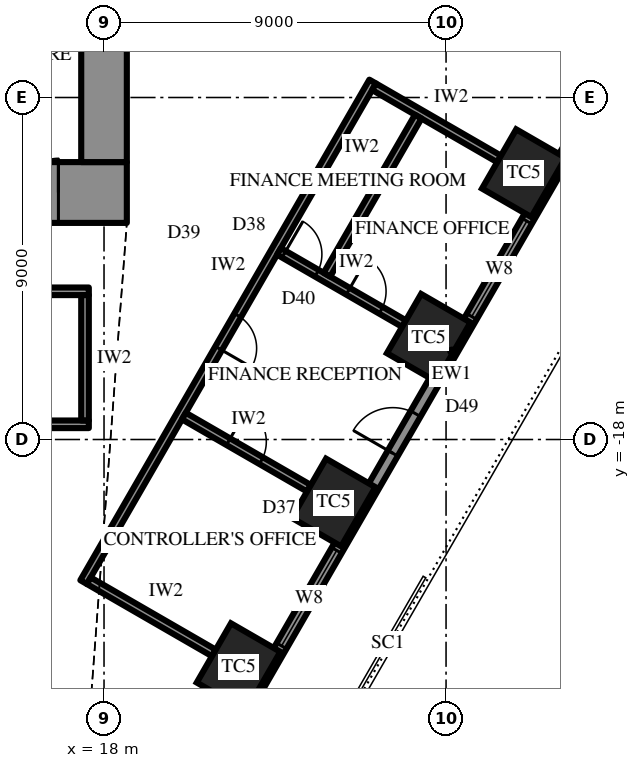
"""IFC4 building model, lengths in metres.
Left out: names, types, materials, properties, quantities, classifications, styles, units other than length and angle.
Written with IfcOpenShell. Run it as: python <this file> out.ifc"""

import sys

from ifc_helpers import new_model, si_unit, direction, frame, frame_2d, origin, origin_2d, place, context, subcontext, project, spatial, rectangle, extrude, element, fill, save


model = new_model("IFC4")
c1 = context("Model", 3, precision=1e-05, world=origin(), true_north=direction((0.0, 1.0)))
c2 = subcontext(c1, "Body", "Model", "MODEL_VIEW")
j1 = project(units=[si_unit("LENGTHUNIT", "METRE"), si_unit("PLANEANGLEUNIT", "RADIAN")], contexts=[c1])
p1 = place(None, origin())
s1 = spatial("IfcSite", under=j1, at=p1, CompositionType="ELEMENT")
p2 = place(p1, origin())
s2 = spatial("IfcBuilding", under=s1, at=p2, CompositionType="ELEMENT")
p3 = place(p2, frame((0.0, 0.0, 132.1)))
s3 = spatial("IfcBuildingStorey", under=s2, at=p3, CompositionType="ELEMENT", Elevation=132.1)
for number, where, z_axis, x_axis in (
    (1, (21.54, -23.992, 0.0), (0.0, 0.0, 1.0), (0.5, 0.866, 0.0)),
    (2, (24.042, -19.658, 0.0), (0.0, 0.0, 1.0), (0.5, 0.866, 0.0)),
    (3, (26.544, -15.325, 0.0), (0.0, 0.0, 1.0), (0.5, 0.866, 0.0)),
    (4, (29.045, -10.992, 0.0), (0.0, 0.0, 1.0), (0.5, 0.866, 0.0)),
):
    element("IfcColumn", number, at=place(p3, frame(where, z_axis=z_axis, x_axis=x_axis)), inside=s3, PredefinedType="COLUMN", context=c2, shape_type="SweptSolid", body=[
        extrude(rectangle(XDim=1.8, YDim=1.5, at=origin_2d()), origin(), (0.0, 0.0, 1.0), 4.2),
    ])
p4 = place(p3, frame((18.6, -11.5, 0.0), z_axis=(0.0, 0.0, 1.0), x_axis=(-1.0, 0.0, 0.0)))
e5 = element("IfcWall", 5, at=p4, inside=s3, PredefinedType="SHEAR", context=c2, shape_type="SweptSolid", body=[
    extrude(rectangle(XDim=37.2, YDim=1.6, at=frame_2d((18.6, 0.0))), origin(), (0.0, 0.0, 1.0), 4.2),
])
p5 = place(p4, frame((19.45, 0.0, 0.0)))
e6 = element("IfcOpeningElement", 6, at=p5, cuts=e5, PredefinedType="OPENING", context=c2, shape_type="SweptSolid", body=[
    extrude(rectangle(XDim=0.9, YDim=2.2, at=frame_2d((0.45, 1.1))), frame((0.0, 0.81, 0.0), z_axis=(0.0, -1.0, 0.0), x_axis=(1.0, 0.0, 0.0)), (0.0, 0.0, 1.0), 1.62),
])
p6 = place(p4, frame((22.45, 0.0, 0.0)))
e7 = element("IfcOpeningElement", 7, at=p6, cuts=e5, PredefinedType="OPENING", context=c2, shape_type="SweptSolid", body=[
    extrude(rectangle(XDim=0.9, YDim=2.2, at=frame_2d((0.45, 1.1))), frame((0.0, 0.81, 0.0), z_axis=(0.0, -1.0, 0.0), x_axis=(1.0, 0.0, 0.0)), (0.0, 0.0, 1.0), 1.62),
])
p7 = place(p4, frame((25.5, 0.0, 0.0)))
e8 = element("IfcOpeningElement", 8, at=p7, cuts=e5, PredefinedType="OPENING", context=c2, shape_type="SweptSolid", body=[
    extrude(rectangle(XDim=1.0, YDim=2.2, at=frame_2d((0.5, 1.1))), frame((0.0, 0.81, 0.0), z_axis=(0.0, -1.0, 0.0), x_axis=(1.0, 0.0, 0.0)), (0.0, 0.0, 1.0), 1.62),
])
p8 = place(p4, frame((1.8, 0.0, 0.0)))
e9 = element("IfcOpeningElement", 9, at=p8, cuts=e5, PredefinedType="OPENING", context=c2, shape_type="SweptSolid", body=[
    extrude(rectangle(XDim=0.9, YDim=2.2, at=frame_2d((0.45, 1.1))), frame((0.0, 0.81, 0.0), z_axis=(0.0, -1.0, 0.0), x_axis=(1.0, 0.0, 0.0)), (0.0, 0.0, 1.0), 1.62),
])
p9 = place(p4, frame((4.65, 0.0, 0.0)))
e10 = element("IfcOpeningElement", 10, at=p9, cuts=e5, PredefinedType="OPENING", context=c2, shape_type="SweptSolid", body=[
    extrude(rectangle(XDim=0.9, YDim=2.2, at=frame_2d((0.45, 1.1))), frame((0.0, 0.81, 0.0), z_axis=(0.0, -1.0, 0.0), x_axis=(1.0, 0.0, 0.0)), (0.0, 0.0, 1.0), 1.62),
])
p10 = place(p4, frame((7.75, 0.0, 0.0)))
e11 = element("IfcOpeningElement", 11, at=p10, cuts=e5, PredefinedType="OPENING", context=c2, shape_type="SweptSolid", body=[
    extrude(rectangle(XDim=0.9, YDim=2.2, at=frame_2d((0.45, 1.1))), frame((0.0, 0.81, 0.0), z_axis=(0.0, -1.0, 0.0), x_axis=(1.0, 0.0, 0.0)), (0.0, 0.0, 1.0), 1.62),
])
p11 = place(p4, frame((28.55, 0.0, 0.0)))
e12 = element("IfcOpeningElement", 12, at=p11, cuts=e5, PredefinedType="OPENING", context=c2, shape_type="SweptSolid", body=[
    extrude(rectangle(XDim=0.9, YDim=2.2, at=frame_2d((0.45, 1.1))), frame((0.0, 0.81, 0.0), z_axis=(0.0, -1.0, 0.0), x_axis=(1.0, 0.0, 0.0)), (0.0, 0.0, 1.0), 1.62),
])
p12 = place(p4, frame((31.65, 0.0, 0.0)))
e13 = element("IfcOpeningElement", 13, at=p12, cuts=e5, PredefinedType="OPENING", context=c2, shape_type="SweptSolid", body=[
    extrude(rectangle(XDim=0.9, YDim=2.2, at=frame_2d((0.45, 1.1))), frame((0.0, 0.81, 0.0), z_axis=(0.0, -1.0, 0.0), x_axis=(1.0, 0.0, 0.0)), (0.0, 0.0, 1.0), 1.62),
])
p13 = place(p4, frame((34.5, 0.0, 0.0)))
e14 = element("IfcOpeningElement", 14, at=p13, cuts=e5, PredefinedType="OPENING", context=c2, shape_type="SweptSolid", body=[
    extrude(rectangle(XDim=0.9, YDim=2.2, at=frame_2d((0.45, 1.1))), frame((0.0, 0.81, 0.0), z_axis=(0.0, -1.0, 0.0), x_axis=(1.0, 0.0, 0.0)), (0.0, 0.0, 1.0), 1.62),
])
p14 = place(p3, frame((18.0, -10.7, 0.0), z_axis=(0.0, 0.0, 1.0), x_axis=(0.0, 1.0, 0.0)))
e15 = element("IfcWall", 15, at=p14, inside=s3, PredefinedType="SHEAR", context=c2, shape_type="SweptSolid", body=[
    extrude(rectangle(XDim=21.4, YDim=1.2, at=frame_2d((10.7, 0.0))), origin(), (0.0, 0.0, 1.0), 4.2),
])
p15 = place(p14, frame((9.8, 0.0, 0.0)))
e16 = element("IfcOpeningElement", 16, at=p15, cuts=e15, PredefinedType="OPENING", context=c2, shape_type="SweptSolid", body=[
    extrude(rectangle(XDim=1.8, YDim=2.4, at=frame_2d((0.9, 1.2))), frame((0.0, 0.61, 0.0), z_axis=(0.0, -1.0, 0.0), x_axis=(1.0, 0.0, 0.0)), (0.0, 0.0, 1.0), 1.22),
])
p16 = place(p3, frame((19.644, -28.675, 0.0), z_axis=(0.0, 0.0, 1.0), x_axis=(0.500003084452, 0.866023622968, 0.0)))
e17 = element("IfcWall", 17, at=p16, inside=s3, PredefinedType="SOLIDWALL", context=c2, shape_type="SweptSolid", body=[
    extrude(rectangle(XDim=30.022, YDim=0.3, at=frame_2d((15.011, 0.0))), origin(), (0.0, 0.0, 1.0), 2.3),
])
p17 = place(p16, frame((1.052, 0.0, 0.6)))
e18 = element("IfcOpeningElement", 18, at=p17, cuts=e17, PredefinedType="OPENING", context=c2, shape_type="SweptSolid", body=[
    extrude(rectangle(XDim=2.9, YDim=1.45, at=frame_2d((1.45, 0.725))), frame((0.0, 0.16, 0.0), z_axis=(0.0, -1.0, 0.0), x_axis=(1.0, 0.0, 0.0)), (0.0, 0.0, 1.0), 0.32),
])
p18 = place(p16, frame((6.056, 0.0, 0.6)))
e19 = element("IfcOpeningElement", 19, at=p18, cuts=e17, PredefinedType="OPENING", context=c2, shape_type="SweptSolid", body=[
    extrude(rectangle(XDim=2.9, YDim=1.45, at=frame_2d((1.45, 0.725))), frame((0.0, 0.16, 0.0), z_axis=(0.0, -1.0, 0.0), x_axis=(1.0, 0.0, 0.0)), (0.0, 0.0, 1.0), 0.32),
])
p19 = place(p16, frame((11.909, 0.0, 0.0)))
e20 = element("IfcOpeningElement", 20, at=p19, cuts=e17, PredefinedType="OPENING", context=c2, shape_type="SweptSolid", body=[
    extrude(rectangle(XDim=1.2, YDim=2.2, at=frame_2d((0.6, 1.1))), frame((0.0, 0.16, 0.0), z_axis=(0.0, -1.0, 0.0), x_axis=(1.0, 0.0, 0.0)), (0.0, 0.0, 1.0), 0.32),
])
p20 = place(p16, frame((16.063, 0.0, 0.6)))
e21 = element("IfcOpeningElement", 21, at=p20, cuts=e17, PredefinedType="OPENING", context=c2, shape_type="SweptSolid", body=[
    extrude(rectangle(XDim=2.9, YDim=1.45, at=frame_2d((1.45, 0.725))), frame((0.0, 0.16, 0.0), z_axis=(0.0, -1.0, 0.0), x_axis=(1.0, 0.0, 0.0)), (0.0, 0.0, 1.0), 0.32),
])
p21 = place(p16, frame((21.067, 0.0, 0.6)))
e22 = element("IfcOpeningElement", 22, at=p21, cuts=e17, PredefinedType="OPENING", context=c2, shape_type="SweptSolid", body=[
    extrude(rectangle(XDim=2.9, YDim=1.45, at=frame_2d((1.45, 0.725))), frame((0.0, 0.16, 0.0), z_axis=(0.0, -1.0, 0.0), x_axis=(1.0, 0.0, 0.0)), (0.0, 0.0, 1.0), 0.32),
])
p22 = place(p16, frame((26.07, 0.0, 0.6)))
e23 = element("IfcOpeningElement", 23, at=p22, cuts=e17, PredefinedType="OPENING", context=c2, shape_type="SweptSolid", body=[
    extrude(rectangle(XDim=2.9, YDim=1.45, at=frame_2d((1.45, 0.725))), frame((0.0, 0.16, 0.0), z_axis=(0.0, -1.0, 0.0), x_axis=(1.0, 0.0, 0.0)), (0.0, 0.0, 1.0), 0.32),
])
p23 = place(p3, frame((17.6, -14.1, 0.0), z_axis=(0.0, 0.0, 1.0), x_axis=(-1.0, 0.0, 0.0)))
e24 = element("IfcWall", 24, at=p23, inside=s3, PredefinedType="PARTITIONING", context=c2, shape_type="SweptSolid", body=[
    extrude(rectangle(XDim=35.2, YDim=0.2, at=frame_2d((17.6, 0.0))), origin(), (0.0, 0.0, 1.0), 4.0),
])
p24 = place(p3, frame((17.6, -17.6, 0.0), z_axis=(0.0, 0.0, 1.0), x_axis=(-1.0, 0.0, 0.0)))
e25 = element("IfcWall", 25, at=p24, inside=s3, PredefinedType="PARTITIONING", context=c2, shape_type="SweptSolid", body=[
    extrude(rectangle(XDim=35.2, YDim=0.2, at=frame_2d((17.6, 0.0))), origin(), (0.0, 0.0, 1.0), 4.0),
])
p25 = place(p24, frame((7.95, 0.0, 0.0)))
e26 = element("IfcOpeningElement", 26, at=p25, cuts=e25, PredefinedType="OPENING", context=c2, shape_type="SweptSolid", body=[
    extrude(rectangle(XDim=1.8, YDim=2.4, at=frame_2d((0.9, 1.2))), frame((0.0, 0.11, 0.0), z_axis=(0.0, -1.0, 0.0), x_axis=(1.0, 0.0, 0.0)), (0.0, 0.0, 1.0), 0.22),
])
p26 = place(p24, frame((25.45, 0.0, 0.0)))
e27 = element("IfcOpeningElement", 27, at=p26, cuts=e25, PredefinedType="OPENING", context=c2, shape_type="SweptSolid", body=[
    extrude(rectangle(XDim=1.8, YDim=2.4, at=frame_2d((0.9, 1.2))), frame((0.0, 0.11, 0.0), z_axis=(0.0, -1.0, 0.0), x_axis=(1.0, 0.0, 0.0)), (0.0, 0.0, 1.0), 0.22),
])
p27 = place(p3, frame((17.5, -14.2, 0.0), z_axis=(0.0, 0.0, 1.0), x_axis=(0.0, -1.0, 0.0)))
e28 = element("IfcWall", 28, at=p27, inside=s3, PredefinedType="PARTITIONING", context=c2, shape_type="SweptSolid", body=[
    extrude(rectangle(XDim=3.3, YDim=0.2, at=frame_2d((1.65, 0.0))), origin(), (0.0, 0.0, 1.0), 4.0),
])
p28 = place(p3, frame((17.463, -21.753, 0.0), z_axis=(0.0, 0.0, 1.0), x_axis=(0.500010972563, 0.86601906868, 0.0)))
e29 = element("IfcWall", 29, at=p28, inside=s3, PredefinedType="PARTITIONING", context=c2, shape_type="SweptSolid", body=[
    extrude(rectangle(XDim=15.211, YDim=0.2, at=frame_2d((7.605, 0.0))), origin(), (0.0, 0.0, 1.0), 4.0),
])
p29 = place(p28, frame((7.105, 0.0, 0.0)))
e30 = element("IfcOpeningElement", 30, at=p29, cuts=e29, PredefinedType="OPENING", context=c2, shape_type="SweptSolid", body=[
    extrude(rectangle(XDim=1.0, YDim=2.2, at=frame_2d((0.5, 1.1))), frame((0.0, 0.11, 0.0), z_axis=(0.0, -1.0, 0.0), x_axis=(1.0, 0.0, 0.0)), (0.0, 0.0, 1.0), 0.22),
])
p30 = place(p3, frame((17.6, -21.717, 0.0), z_axis=(0.0, 0.0, 1.0), x_axis=(0.866000483506, -0.500043160704, 0.0)))
e31 = element("IfcWall", 31, at=p30, inside=s3, PredefinedType="PARTITIONING", context=c2, shape_type="SweptSolid", body=[
    extrude(rectangle(XDim=3.8, YDim=0.2, at=frame_2d((1.9, 0.0))), origin(), (0.0, 0.0, 1.0), 3.082),
])
p31 = place(p3, frame((20.101, -17.383, 0.0), z_axis=(0.0, 0.0, 1.0), x_axis=(0.86601654697, -0.500015340139, 0.0)))
e32 = element("IfcWall", 32, at=p31, inside=s3, PredefinedType="PARTITIONING", context=c2, shape_type="SweptSolid", body=[
    extrude(rectangle(XDim=3.8, YDim=0.2, at=frame_2d((1.9, 0.0))), origin(), (0.0, 0.0, 1.0), 3.082),
])
p32 = place(p31, frame((1.35, 0.0, 0.0)))
e33 = element("IfcOpeningElement", 33, at=p32, cuts=e32, PredefinedType="OPENING", context=c2, shape_type="SweptSolid", body=[
    extrude(rectangle(XDim=1.0, YDim=2.2, at=frame_2d((0.5, 1.1))), frame((0.0, 0.11, 0.0), z_axis=(0.0, -1.0, 0.0), x_axis=(1.0, 0.0, 0.0)), (0.0, 0.0, 1.0), 0.22),
])
p33 = place(p3, frame((22.603, -13.05, 0.0), z_axis=(0.0, 0.0, 1.0), x_axis=(0.866028304915, -0.499994975061, 0.0)))
e34 = element("IfcWall", 34, at=p33, inside=s3, PredefinedType="PARTITIONING", context=c2, shape_type="SweptSolid", body=[
    extrude(rectangle(XDim=3.8, YDim=0.2, at=frame_2d((1.9, 0.0))), origin(), (0.0, 0.0, 1.0), 4.0),
])
p34 = place(p33, frame((0.15, 0.0, 0.0)))
e35 = element("IfcOpeningElement", 35, at=p34, cuts=e34, PredefinedType="OPENING", context=c2, shape_type="SweptSolid", body=[
    extrude(rectangle(XDim=1.0, YDim=2.2, at=frame_2d((0.5, 1.1))), frame((0.0, 0.11, 0.0), z_axis=(0.0, -1.0, 0.0), x_axis=(1.0, 0.0, 0.0)), (0.0, 0.0, 1.0), 0.22),
])
p35 = place(p33, frame((2.1, 0.0, 0.0)))
e36 = element("IfcOpeningElement", 36, at=p35, cuts=e34, PredefinedType="OPENING", context=c2, shape_type="SweptSolid", body=[
    extrude(rectangle(XDim=1.0, YDim=2.2, at=frame_2d((0.5, 1.1))), frame((0.0, 0.11, 0.0), z_axis=(0.0, -1.0, 0.0), x_axis=(1.0, 0.0, 0.0)), (0.0, 0.0, 1.0), 0.22),
])
p36 = place(p3, frame((25.105, -8.717, 0.0), z_axis=(0.0, 0.0, 1.0), x_axis=(0.866000483506, -0.500043160704, 0.0)))
e37 = element("IfcWall", 37, at=p36, inside=s3, PredefinedType="PARTITIONING", context=c2, shape_type="SweptSolid", body=[
    extrude(rectangle(XDim=3.8, YDim=0.2, at=frame_2d((1.9, 0.0))), origin(), (0.0, 0.0, 1.0), 3.082),
])
p37 = place(p3, frame((23.866, -13.663, 0.0), z_axis=(0.0, 0.0, 1.0), x_axis=(0.499998147991, 0.86602647304, 0.0)))
e38 = element("IfcWall", 38, at=p37, inside=s3, PredefinedType="PARTITIONING", context=c2, shape_type="SweptSolid", body=[
    extrude(rectangle(XDim=4.804, YDim=0.2, at=frame_2d((2.402, 0.0))), origin(), (0.0, 0.0, 1.0), 4.0),
])
p38 = place(p18, origin())
e39 = element("IfcWindow", 39, at=p38, inside=s3, PartitioningType="SINGLE_PANEL", PredefinedType="WINDOW", context=c2, shape_type="SweptSolid", body=[
    extrude(rectangle(XDim=2.9, YDim=1.45, at=frame_2d((1.45, 0.725))), frame((0.0, 0.03, 0.0), z_axis=(0.0, -1.0, 0.0), x_axis=(1.0, 0.0, 0.0)), (0.0, 0.0, 1.0), 0.06),
])
fill(e19, e39)
p39 = place(p19, origin())
e40 = element("IfcDoor", 40, at=p39, inside=s3, OperationType="SINGLE_SWING_RIGHT", PredefinedType="DOOR", context=c2, shape_type="SweptSolid", body=[
    extrude(rectangle(XDim=1.2, YDim=2.2, at=frame_2d((0.6, 1.1))), frame((0.0, 0.025, 0.0), z_axis=(0.0, -1.0, 0.0), x_axis=(1.0, 0.0, 0.0)), (0.0, 0.0, 1.0), 0.05),
])
fill(e20, e40)
p40 = place(p20, origin())
e41 = element("IfcWindow", 41, at=p40, inside=s3, PartitioningType="SINGLE_PANEL", PredefinedType="WINDOW", context=c2, shape_type="SweptSolid", body=[
    extrude(rectangle(XDim=2.9, YDim=1.45, at=frame_2d((1.45, 0.725))), frame((0.0, 0.03, 0.0), z_axis=(0.0, -1.0, 0.0), x_axis=(1.0, 0.0, 0.0)), (0.0, 0.0, 1.0), 0.06),
])
fill(e21, e41)
p41 = place(p8, frame((0.9, 0.0, 0.0), z_axis=(0.0, 0.0, 1.0), x_axis=(-1.0, 0.0, 0.0)))
e42 = element("IfcDoor", 42, at=p41, inside=s3, OperationType="SINGLE_SWING_LEFT", PredefinedType="DOOR", context=c2, shape_type="SweptSolid", body=[
    extrude(rectangle(XDim=0.9, YDim=2.2, at=frame_2d((0.45, 1.1))), frame((0.0, 0.025, 0.0), z_axis=(0.0, -1.0, 0.0), x_axis=(1.0, 0.0, 0.0)), (0.0, 0.0, 1.0), 0.05),
])
fill(e9, e42)
p42 = place(p32, origin())
e43 = element("IfcDoor", 43, at=p42, inside=s3, OperationType="SINGLE_SWING_RIGHT", PredefinedType="DOOR", context=c2, shape_type="SweptSolid", body=[
    extrude(rectangle(XDim=1.0, YDim=2.2, at=frame_2d((0.5, 1.1))), frame((0.0, 0.025, 0.0), z_axis=(0.0, -1.0, 0.0), x_axis=(1.0, 0.0, 0.0)), (0.0, 0.0, 1.0), 0.05),
])
fill(e33, e43)
p43 = place(p29, frame((1.0, 0.0, 0.0), z_axis=(0.0, 0.0, 1.0), x_axis=(-1.0, 0.0, 0.0)))
e44 = element("IfcDoor", 44, at=p43, inside=s3, OperationType="SINGLE_SWING_LEFT", PredefinedType="DOOR", context=c2, shape_type="SweptSolid", body=[
    extrude(rectangle(XDim=1.0, YDim=2.2, at=frame_2d((0.5, 1.1))), frame((0.0, 0.025, 0.0), z_axis=(0.0, -1.0, 0.0), x_axis=(1.0, 0.0, 0.0)), (0.0, 0.0, 1.0), 0.05),
])
fill(e30, e44)
p44 = place(p34, origin())
e45 = element("IfcDoor", 45, at=p44, inside=s3, OperationType="SINGLE_SWING_RIGHT", PredefinedType="DOOR", context=c2, shape_type="SweptSolid", body=[
    extrude(rectangle(XDim=1.0, YDim=2.2, at=frame_2d((0.5, 1.1))), frame((0.0, 0.025, 0.0), z_axis=(0.0, -1.0, 0.0), x_axis=(1.0, 0.0, 0.0)), (0.0, 0.0, 1.0), 0.05),
])
fill(e35, e45)
p45 = place(p35, origin())
e46 = element("IfcDoor", 46, at=p45, inside=s3, OperationType="SINGLE_SWING_RIGHT", PredefinedType="DOOR", context=c2, shape_type="SweptSolid", body=[
    extrude(rectangle(XDim=1.0, YDim=2.2, at=frame_2d((0.5, 1.1))), frame((0.0, 0.025, 0.0), z_axis=(0.0, -1.0, 0.0), x_axis=(1.0, 0.0, 0.0)), (0.0, 0.0, 1.0), 0.05),
])
fill(e36, e46)
save(model, sys.argv[1])
